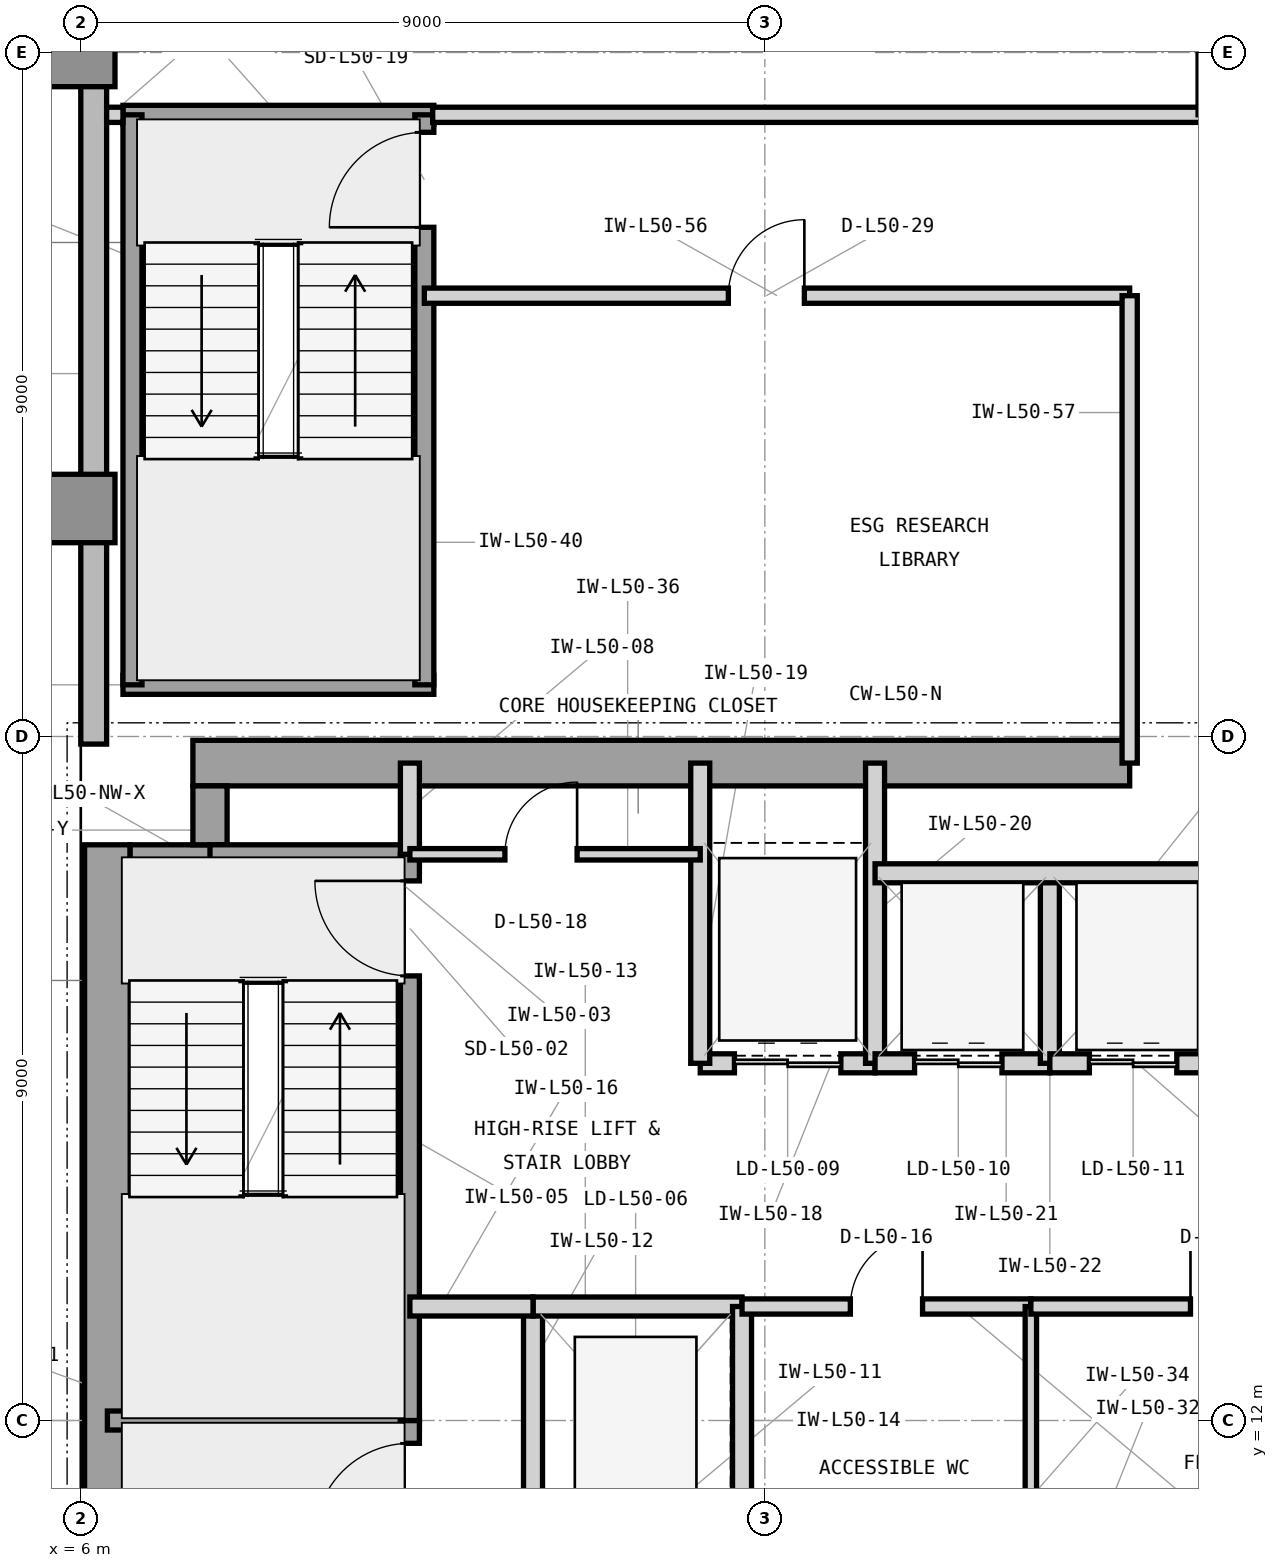
"""IFC4 building model, lengths in metres.
Left out: names, types, materials, properties, quantities, classifications, styles, units other than length and angle.
Written with IfcOpenShell. Run it as: python <this file> out.ifc"""

import sys

from ifc_helpers import new_model, si_unit, direction, frame, frame_2d, origin, origin_2d, place, context, subcontext, project, spatial, rectangle, extrude, element, fill, save


model = new_model("IFC4")
c1 = context("Model", 3, precision=1e-05, world=origin(), true_north=direction((0.0, 1.0)))
c2 = subcontext(c1, "Body", "Model", "MODEL_VIEW")
j1 = project(units=[si_unit("LENGTHUNIT", "METRE"), si_unit("PLANEANGLEUNIT", "RADIAN")], contexts=[c1])
p1 = place(None, origin())
s1 = spatial("IfcSite", under=j1, at=p1, CompositionType="ELEMENT")
p2 = place(p1, origin())
s2 = spatial("IfcBuilding", under=s1, at=p2, CompositionType="ELEMENT")
p3 = place(p2, frame((0.0, 0.0, 207.3)))
s3 = spatial("IfcBuildingStorey", under=s2, at=p3, CompositionType="ELEMENT", Elevation=207.3)
p4 = place(p3, frame((6.35, 4.425, 0.0), z_axis=(0.0, 0.0, 1.0), x_axis=(0.0, 1.0, 0.0)))
e1 = element("IfcWall", 1, at=p4, inside=s3, PredefinedType="SHEAR", context=c2, shape_type="SweptSolid", body=[
    extrude(rectangle(XDim=15.15, YDim=0.6, at=frame_2d((7.575, 0.0))), origin(), (0.0, 0.0, 1.0), 3.9),
])
p5 = place(p3, frame((7.475, 20.65, 0.0), z_axis=(0.0, 0.0, 1.0), x_axis=(1.0, 0.0, 0.0)))
e2 = element("IfcWall", 2, at=p5, inside=s3, PredefinedType="SHEAR", context=c2, shape_type="SweptSolid", body=[
    extrude(rectangle(XDim=12.325, YDim=0.6, at=frame_2d((6.163, 0.0))), origin(), (0.0, 0.0, 1.0), 3.9),
])
p6 = place(p3, frame((6.65, 19.35, 0.0), z_axis=(0.0, 0.0, 1.0), x_axis=(1.0, 0.0, 0.0)))
e3 = element("IfcWall", 3, at=p6, inside=s3, PredefinedType="SHEAR", context=c2, shape_type="SweptSolid", body=[
    extrude(rectangle(XDim=1.275, YDim=0.45, at=frame_2d((0.638, 0.0))), origin(), (0.0, 0.0, 1.0), 3.9),
])
p7 = place(p3, frame((7.7, 19.575, 0.0), z_axis=(0.0, 0.0, 1.0), x_axis=(0.0, 1.0, 0.0)))
e4 = element("IfcWall", 4, at=p7, inside=s3, PredefinedType="SHEAR", context=c2, shape_type="SweptSolid", body=[
    extrude(rectangle(XDim=0.775, YDim=0.45, at=frame_2d((0.388, 0.0))), origin(), (0.0, 0.0, 1.0), 3.9),
])
for number, where, z_axis, x_axis in (
    (5, (6.0, 24.0, 0.0), (0.0, 0.0, 1.0), (1.0, 0.0, 0.0)),
    (6, (6.0, 30.0, 0.0), (0.0, 0.0, 1.0), (1.0, 0.0, 0.0)),
):
    element("IfcColumn", number, at=place(p3, frame(where, z_axis=z_axis, x_axis=x_axis)), inside=s3, PredefinedType="COLUMN", context=c2, shape_type="SweptSolid", body=[
        extrude(rectangle(XDim=0.9, YDim=0.9, at=origin_2d()), origin(), (0.0, 0.0, 1.0), 3.9),
    ])
p8 = place(p3, frame((6.17, 40.4, 0.0), z_axis=(0.0, 0.0, 1.0), x_axis=(0.0, -1.0, 0.0)))
e7 = element("IfcWall", 7, at=p8, inside=s3, PredefinedType="STANDARD", context=c2, shape_type="SweptSolid", body=[
    extrude(rectangle(XDim=19.5, YDim=0.34, at=frame_2d((9.75, 0.0))), origin(), (0.0, 0.0, 1.0), 3.7),
])
p9 = place(p8, frame((7.125, 0.0, 0.9)))
e8 = element("IfcOpeningElement", 8, at=p9, cuts=e7, PredefinedType="OPENING", context=c2, shape_type="SweptSolid", body=[
    extrude(rectangle(XDim=2.3, YDim=2.2, at=frame_2d((1.15, 1.1))), frame((0.0, 0.18, 0.0), z_axis=(0.0, -1.0, 0.0), x_axis=(1.0, 0.0, 0.0)), (0.0, 0.0, 1.0), 0.36),
])
p10 = place(p3, frame((6.35, 12.0, 0.0), z_axis=(0.0, 0.0, 1.0), x_axis=(1.0, 0.0, 0.0)))
e9 = element("IfcWall", 9, at=p10, inside=s3, PredefinedType="SHEAR", context=c2, shape_type="SweptSolid", body=[
    extrude(rectangle(XDim=4.105, YDim=0.25, at=frame_2d((2.052, 0.0))), origin(), (0.0, 0.0, 1.0), 3.9),
])
p11 = place(p3, frame((7.7, 19.45, 0.0), z_axis=(0.0, 0.0, 1.0), x_axis=(1.0, 0.0, 0.0)))
e10 = element("IfcWall", 10, at=p11, inside=s3, PredefinedType="SHEAR", context=c2, shape_type="SweptSolid", body=[
    extrude(rectangle(XDim=2.755, YDim=0.25, at=frame_2d((1.377, 0.0))), origin(), (0.0, 0.0, 1.0), 3.9),
])
p12 = place(p3, frame((10.33, 4.55, 0.0), z_axis=(0.0, 0.0, 1.0), x_axis=(0.0, 1.0, 0.0)))
e11 = element("IfcWall", 11, at=p12, inside=s3, PredefinedType="SHEAR", context=c2, shape_type="SweptSolid", body=[
    extrude(rectangle(XDim=7.45, YDim=0.25, at=frame_2d((3.725, 0.0))), origin(), (0.0, 0.0, 1.0), 3.9),
])
p13 = place(p12, frame((5.9, 0.0, 0.0)))
e12 = element("IfcOpeningElement", 12, at=p13, cuts=e11, PredefinedType="OPENING", context=c2, shape_type="SweptSolid", body=[
    extrude(rectangle(XDim=1.25, YDim=2.2, at=frame_2d((0.625, 1.1))), frame((0.0, 0.135, 0.0), z_axis=(0.0, -1.0, 0.0), x_axis=(1.0, 0.0, 0.0)), (0.0, 0.0, 1.0), 0.27),
])
p14 = place(p3, frame((10.33, 12.0, 0.0), z_axis=(0.0, 0.0, 1.0), x_axis=(0.0, 1.0, 0.0)))
e13 = element("IfcWall", 13, at=p14, inside=s3, PredefinedType="SHEAR", context=c2, shape_type="SweptSolid", body=[
    extrude(rectangle(XDim=7.45, YDim=0.25, at=frame_2d((3.725, 0.0))), origin(), (0.0, 0.0, 1.0), 3.9),
])
p15 = place(p14, frame((5.85, 0.0, 0.0)))
e14 = element("IfcOpeningElement", 14, at=p15, cuts=e13, PredefinedType="OPENING", context=c2, shape_type="SweptSolid", body=[
    extrude(rectangle(XDim=1.25, YDim=2.2, at=frame_2d((0.625, 1.1))), frame((0.0, 0.135, 0.0), z_axis=(0.0, -1.0, 0.0), x_axis=(1.0, 0.0, 0.0)), (0.0, 0.0, 1.0), 0.27),
])
p16 = place(p3, frame((10.33, 19.45, 0.0), z_axis=(0.0, 0.0, 1.0), x_axis=(0.0, 1.0, 0.0)))
e15 = element("IfcWall", 15, at=p16, inside=s3, PredefinedType="PARTITIONING", context=c2, shape_type="SweptSolid", body=[
    extrude(rectangle(XDim=1.2, YDim=0.25, at=frame_2d((0.6, 0.0))), origin(), (0.0, 0.0, 1.0), 3.69),
])
p17 = place(p3, frame((11.95, 10.5, 0.0), z_axis=(0.0, 0.0, 1.0), x_axis=(0.0, 1.0, 0.0)))
e16 = element("IfcWall", 16, at=p17, inside=s3, PredefinedType="PARTITIONING", context=c2, shape_type="SweptSolid", body=[
    extrude(rectangle(XDim=3.0, YDim=0.25, at=frame_2d((1.5, 0.0))), origin(), (0.0, 0.0, 1.0), 3.69),
])
p18 = place(p3, frame((11.95, 13.5, 0.0), z_axis=(0.0, 0.0, 1.0), x_axis=(1.0, 0.0, 0.0)))
e17 = element("IfcWall", 17, at=p18, inside=s3, PredefinedType="PARTITIONING", context=c2, shape_type="SweptSolid", body=[
    extrude(rectangle(XDim=2.75, YDim=0.25, at=frame_2d((1.375, 0.0))), origin(), (0.0, 0.0, 1.0), 3.283),
])
p19 = place(p3, frame((14.7, 10.5, 0.0), z_axis=(0.0, 0.0, 1.0), x_axis=(0.0, 1.0, 0.0)))
e18 = element("IfcWall", 18, at=p19, inside=s3, PredefinedType="PARTITIONING", context=c2, shape_type="SweptSolid", body=[
    extrude(rectangle(XDim=3.0, YDim=0.25, at=frame_2d((1.5, 0.0))), origin(), (0.0, 0.0, 1.0), 3.69),
])
p20 = place(p3, frame((10.33, 13.5, 0.0), z_axis=(0.0, 0.0, 1.0), x_axis=(1.0, 0.0, 0.0)))
e19 = element("IfcWall", 19, at=p20, inside=s3, PredefinedType="PARTITIONING", context=c2, shape_type="SweptSolid", body=[
    extrude(rectangle(XDim=1.62, YDim=0.25, at=frame_2d((0.81, 0.0))), origin(), (0.0, 0.0, 1.0), 3.283),
])
p21 = place(p3, frame((14.15, 16.7, 0.0), z_axis=(0.0, 0.0, 1.0), x_axis=(1.0, 0.0, 0.0)))
e20 = element("IfcWall", 20, at=p21, inside=s3, PredefinedType="PARTITIONING", context=c2, shape_type="SweptSolid", body=[
    extrude(rectangle(XDim=2.3, YDim=0.25, at=frame_2d((1.15, 0.0))), origin(), (0.0, 0.0, 1.0), 3.283),
])
p22 = place(p21, frame((0.45, 0.0, 0.0)))
e21 = element("IfcOpeningElement", 21, at=p22, cuts=e20, PredefinedType="OPENING", context=c2, shape_type="SweptSolid", body=[
    extrude(rectangle(XDim=1.4, YDim=2.35, at=frame_2d((0.7, 1.175))), frame((0.0, 0.135, 0.0), z_axis=(0.0, -1.0, 0.0), x_axis=(1.0, 0.0, 0.0)), (0.0, 0.0, 1.0), 0.27),
])
for number, where, z_axis, x_axis in (
    (22, (14.15, 16.7, 0.0), (0.0, 0.0, 1.0), (0.0, 1.0, 0.0)),
    (23, (16.45, 16.7, 0.0), (0.0, 0.0, 1.0), (0.0, 1.0, 0.0)),
):
    element("IfcWall", number, at=place(p3, frame(where, z_axis=z_axis, x_axis=x_axis)), inside=s3, PredefinedType="PARTITIONING", context=c2, shape_type="SweptSolid", body=[
        extrude(rectangle(XDim=3.95, YDim=0.25, at=frame_2d((1.975, 0.0))), origin(), (0.0, 0.0, 1.0), 3.69),
    ])
p23 = place(p3, frame((16.45, 16.7, 0.0), z_axis=(0.0, 0.0, 1.0), x_axis=(1.0, 0.0, 0.0)))
e24 = element("IfcWall", 24, at=p23, inside=s3, PredefinedType="PARTITIONING", context=c2, shape_type="SweptSolid", body=[
    extrude(rectangle(XDim=2.3, YDim=0.25, at=frame_2d((1.15, 0.0))), origin(), (0.0, 0.0, 1.0), 3.283),
])
p24 = place(p23, frame((0.52, 0.0, 0.0)))
e25 = element("IfcOpeningElement", 25, at=p24, cuts=e24, PredefinedType="OPENING", context=c2, shape_type="SweptSolid", body=[
    extrude(rectangle(XDim=1.15, YDim=2.25, at=frame_2d((0.575, 1.125))), frame((0.0, 0.135, 0.0), z_axis=(0.0, -1.0, 0.0), x_axis=(1.0, 0.0, 0.0)), (0.0, 0.0, 1.0), 0.27),
])
p25 = place(p3, frame((18.75, 16.7, 0.0), z_axis=(0.0, 0.0, 1.0), x_axis=(0.0, 1.0, 0.0)))
e26 = element("IfcWall", 26, at=p25, inside=s3, PredefinedType="PARTITIONING", context=c2, shape_type="SweptSolid", body=[
    extrude(rectangle(XDim=2.5, YDim=0.25, at=frame_2d((1.25, 0.0))), origin(), (0.0, 0.0, 1.0), 3.69),
])
p26 = place(p3, frame((18.75, 16.7, 0.0), z_axis=(0.0, 0.0, 1.0), x_axis=(1.0, 0.0, 0.0)))
e27 = element("IfcWall", 27, at=p26, inside=s3, PredefinedType="PARTITIONING", context=c2, shape_type="SweptSolid", body=[
    extrude(rectangle(XDim=2.3, YDim=0.25, at=frame_2d((1.15, 0.0))), origin(), (0.0, 0.0, 1.0), 3.283),
])
p27 = place(p26, frame((0.52, 0.0, 0.0)))
e28 = element("IfcOpeningElement", 28, at=p27, cuts=e27, PredefinedType="OPENING", context=c2, shape_type="SweptSolid", body=[
    extrude(rectangle(XDim=1.15, YDim=2.25, at=frame_2d((0.575, 1.125))), frame((0.0, 0.135, 0.0), z_axis=(0.0, -1.0, 0.0), x_axis=(1.0, 0.0, 0.0)), (0.0, 0.0, 1.0), 0.27),
])
p28 = place(p3, frame((16.45, 19.2, 0.0), z_axis=(0.0, 0.0, 1.0), x_axis=(1.0, 0.0, 0.0)))
e29 = element("IfcWall", 29, at=p28, inside=s3, PredefinedType="PARTITIONING", context=c2, shape_type="SweptSolid", body=[
    extrude(rectangle(XDim=7.2, YDim=0.25, at=frame_2d((3.6, 0.0))), origin(), (0.0, 0.0, 1.0), 3.69),
])
p29 = place(p3, frame((14.7, 13.5, 0.0), z_axis=(0.0, 0.0, 1.0), x_axis=(1.0, 0.0, 0.0)))
e30 = element("IfcWall", 30, at=p29, inside=s3, PredefinedType="PARTITIONING", context=c2, shape_type="SweptSolid", body=[
    extrude(rectangle(XDim=3.8, YDim=0.2, at=frame_2d((1.9, 0.0))), origin(), (0.0, 0.0, 1.0), 3.283),
])
p30 = place(p29, frame((1.425, 0.0, 0.0)))
e31 = element("IfcOpeningElement", 31, at=p30, cuts=e30, PredefinedType="OPENING", context=c2, shape_type="SweptSolid", body=[
    extrude(rectangle(XDim=0.95, YDim=2.1, at=frame_2d((0.475, 1.05))), frame((0.0, 0.11, 0.0), z_axis=(0.0, -1.0, 0.0), x_axis=(1.0, 0.0, 0.0)), (0.0, 0.0, 1.0), 0.22),
])
p31 = place(p3, frame((18.5, 10.15, 0.0), z_axis=(0.0, 0.0, 1.0), x_axis=(0.0, 1.0, 0.0)))
e32 = element("IfcWall", 32, at=p31, inside=s3, PredefinedType="PARTITIONING", context=c2, shape_type="SweptSolid", body=[
    extrude(rectangle(XDim=3.35, YDim=0.15, at=frame_2d((1.675, 0.0))), origin(), (0.0, 0.0, 1.0), 3.69),
])
p32 = place(p3, frame((18.5, 13.5, 0.0), z_axis=(0.0, 0.0, 1.0), x_axis=(1.0, 0.0, 0.0)))
e33 = element("IfcWall", 33, at=p32, inside=s3, PredefinedType="PARTITIONING", context=c2, shape_type="SweptSolid", body=[
    extrude(rectangle(XDim=5.15, YDim=0.2, at=frame_2d((2.575, 0.0))), origin(), (0.0, 0.0, 1.0), 3.283),
])
p33 = place(p32, frame((2.1, 0.0, 0.0)))
e34 = element("IfcOpeningElement", 34, at=p33, cuts=e33, PredefinedType="OPENING", context=c2, shape_type="SweptSolid", body=[
    extrude(rectangle(XDim=0.95, YDim=2.1, at=frame_2d((0.475, 1.05))), frame((0.0, 0.11, 0.0), z_axis=(0.0, -1.0, 0.0), x_axis=(1.0, 0.0, 0.0)), (0.0, 0.0, 1.0), 0.22),
])
p34 = place(p3, frame((10.33, 19.45, 0.0), z_axis=(0.0, 0.0, 1.0), x_axis=(1.0, 0.0, 0.0)))
e35 = element("IfcWall", 35, at=p34, inside=s3, PredefinedType="PARTITIONING", context=c2, shape_type="SweptSolid", body=[
    extrude(rectangle(XDim=3.82, YDim=0.15, at=frame_2d((1.91, 0.0))), origin(), (0.0, 0.0, 1.0), 3.69),
])
p35 = place(p34, frame((1.25, 0.0, 0.0)))
e36 = element("IfcOpeningElement", 36, at=p35, cuts=e35, PredefinedType="OPENING", context=c2, shape_type="SweptSolid", body=[
    extrude(rectangle(XDim=0.95, YDim=2.1, at=frame_2d((0.475, 1.05))), frame((0.0, 0.085, 0.0), z_axis=(0.0, -1.0, 0.0), x_axis=(1.0, 0.0, 0.0)), (0.0, 0.0, 1.0), 0.17),
])
for number, where, z_axis, x_axis in (
    (37, (6.555, 21.68, 0.0), (0.0, 0.0, 1.0), (1.0, 0.0, 0.0)),
    (38, (6.555, 29.18, 0.0), (0.0, 0.0, 1.0), (1.0, 0.0, 0.0)),
):
    element("IfcWall", number, at=place(p3, frame(where, z_axis=z_axis, x_axis=x_axis)), inside=s3, PredefinedType="SHEAR", context=c2, shape_type="SweptSolid", body=[
        extrude(rectangle(XDim=4.09, YDim=0.25, at=frame_2d((2.045, 0.0))), origin(), (0.0, 0.0, 1.0), 3.9),
    ])
p36 = place(p3, frame((6.68, 21.68, 0.0), z_axis=(0.0, 0.0, 1.0), x_axis=(0.0, 1.0, 0.0)))
e39 = element("IfcWall", 39, at=p36, inside=s3, PredefinedType="SHEAR", context=c2, shape_type="SweptSolid", body=[
    extrude(rectangle(XDim=7.5, YDim=0.25, at=frame_2d((3.75, 0.0))), origin(), (0.0, 0.0, 1.0), 3.9),
])
p37 = place(p3, frame((10.52, 21.68, 0.0), z_axis=(0.0, 0.0, 1.0), x_axis=(0.0, 1.0, 0.0)))
e40 = element("IfcWall", 40, at=p37, inside=s3, PredefinedType="SHEAR", context=c2, shape_type="SweptSolid", body=[
    extrude(rectangle(XDim=7.5, YDim=0.25, at=frame_2d((3.75, 0.0))), origin(), (0.0, 0.0, 1.0), 3.9),
])
p38 = place(p37, frame((6.02, 0.0, 0.0)))
e41 = element("IfcOpeningElement", 41, at=p38, cuts=e40, PredefinedType="OPENING", context=c2, shape_type="SweptSolid", body=[
    extrude(rectangle(XDim=1.25, YDim=2.2, at=frame_2d((0.625, 1.1))), frame((0.0, 0.135, 0.0), z_axis=(0.0, -1.0, 0.0), x_axis=(1.0, 0.0, 0.0)), (0.0, 0.0, 1.0), 0.27),
])
p39 = place(p3, frame((10.52, 26.8, 0.0), z_axis=(0.0, 0.0, 1.0), x_axis=(1.0, 0.0, 0.0)))
e42 = element("IfcWall", 42, at=p39, inside=s3, PredefinedType="PARTITIONING", context=c2, shape_type="SweptSolid", body=[
    extrude(rectangle(XDim=9.28, YDim=0.2, at=frame_2d((4.64, 0.0))), origin(), (0.0, 0.0, 1.0), 3.69),
])
p40 = place(p39, frame((4.0, 0.0, 0.0)))
e43 = element("IfcOpeningElement", 43, at=p40, cuts=e42, PredefinedType="OPENING", context=c2, shape_type="SweptSolid", body=[
    extrude(rectangle(XDim=1.0, YDim=2.15, at=frame_2d((0.5, 1.075))), frame((0.0, 0.11, 0.0), z_axis=(0.0, -1.0, 0.0), x_axis=(1.0, 0.0, 0.0)), (0.0, 0.0, 1.0), 0.22),
])
p41 = place(p3, frame((19.8, 20.65, 0.0), z_axis=(0.0, 0.0, 1.0), x_axis=(0.0, 1.0, 0.0)))
e44 = element("IfcWall", 44, at=p41, inside=s3, PredefinedType="PARTITIONING", context=c2, shape_type="SweptSolid", body=[
    extrude(rectangle(XDim=6.15, YDim=0.2, at=frame_2d((3.075, 0.0))), origin(), (0.0, 0.0, 1.0), 3.69),
])
p42 = place(p3, frame((6.34, 29.18, 0.0), z_axis=(0.0, 0.0, 1.0), x_axis=(1.0, 0.0, 0.0)))
e45 = element("IfcWall", 45, at=p42, inside=s3, PredefinedType="PARTITIONING", context=c2, shape_type="SweptSolid", body=[
    extrude(rectangle(XDim=0.215, YDim=0.2, at=frame_2d((0.107, 0.0))), origin(), (0.0, 0.0, 1.0), 3.69),
])
p43 = place(p3, frame((10.63, 29.18, 0.0), z_axis=(0.0, 0.0, 1.0), x_axis=(1.0, 0.0, 0.0)))
e46 = element("IfcWall", 46, at=p43, inside=s3, PredefinedType="PARTITIONING", context=c2, shape_type="SweptSolid", body=[
    extrude(rectangle(XDim=10.17, YDim=0.2, at=frame_2d((5.085, 0.0))), origin(), (0.0, 0.0, 1.0), 3.69),
])
p44 = place(p13, origin())
e47 = element("IfcDoor", 47, at=p44, inside=s3, OperationType="SINGLE_SWING_LEFT", PredefinedType="DOOR", context=c2, shape_type="SweptSolid", body=[
    extrude(rectangle(XDim=1.25, YDim=2.2, at=frame_2d((0.625, 1.1))), frame((0.0, 0.025, 0.0), z_axis=(0.0, -1.0, 0.0), x_axis=(1.0, 0.0, 0.0)), (0.0, 0.0, 1.0), 0.05),
])
fill(e12, e47)
p45 = place(p15, origin())
e48 = element("IfcDoor", 48, at=p45, inside=s3, OperationType="SINGLE_SWING_RIGHT", PredefinedType="DOOR", context=c2, shape_type="SweptSolid", body=[
    extrude(rectangle(XDim=1.25, YDim=2.2, at=frame_2d((0.625, 1.1))), frame((0.0, 0.025, 0.0), z_axis=(0.0, -1.0, 0.0), x_axis=(1.0, 0.0, 0.0)), (0.0, 0.0, 1.0), 0.05),
])
fill(e14, e48)
p46 = place(p22, origin())
e49 = element("IfcDoor", 49, at=p46, inside=s3, OperationType="DOUBLE_DOOR_SLIDING", PredefinedType="DOOR", context=c2, shape_type="SweptSolid", body=[
    extrude(rectangle(XDim=1.4, YDim=2.35, at=frame_2d((0.7, 1.175))), frame((0.0, 0.025, 0.0), z_axis=(0.0, -1.0, 0.0), x_axis=(1.0, 0.0, 0.0)), (0.0, 0.0, 1.0), 0.05),
])
fill(e21, e49)
p47 = place(p24, origin())
e50 = element("IfcDoor", 50, at=p47, inside=s3, OperationType="DOUBLE_DOOR_SLIDING", PredefinedType="DOOR", context=c2, shape_type="SweptSolid", body=[
    extrude(rectangle(XDim=1.15, YDim=2.25, at=frame_2d((0.575, 1.125))), frame((0.0, 0.025, 0.0), z_axis=(0.0, -1.0, 0.0), x_axis=(1.0, 0.0, 0.0)), (0.0, 0.0, 1.0), 0.05),
])
fill(e25, e50)
p48 = place(p27, origin())
e51 = element("IfcDoor", 51, at=p48, inside=s3, OperationType="DOUBLE_DOOR_SLIDING", PredefinedType="DOOR", context=c2, shape_type="SweptSolid", body=[
    extrude(rectangle(XDim=1.15, YDim=2.25, at=frame_2d((0.575, 1.125))), frame((0.0, 0.025, 0.0), z_axis=(0.0, -1.0, 0.0), x_axis=(1.0, 0.0, 0.0)), (0.0, 0.0, 1.0), 0.05),
])
fill(e28, e51)
p49 = place(p30, origin())
e52 = element("IfcDoor", 52, at=p49, inside=s3, OperationType="SINGLE_SWING_RIGHT", PredefinedType="DOOR", context=c2, shape_type="SweptSolid", body=[
    extrude(rectangle(XDim=0.95, YDim=2.1, at=frame_2d((0.475, 1.05))), frame((0.0, 0.025, 0.0), z_axis=(0.0, -1.0, 0.0), x_axis=(1.0, 0.0, 0.0)), (0.0, 0.0, 1.0), 0.05),
])
fill(e31, e52)
p50 = place(p33, origin())
e53 = element("IfcDoor", 53, at=p50, inside=s3, OperationType="SINGLE_SWING_LEFT", PredefinedType="DOOR", context=c2, shape_type="SweptSolid", body=[
    extrude(rectangle(XDim=0.95, YDim=2.1, at=frame_2d((0.475, 1.05))), frame((0.0, 0.025, 0.0), z_axis=(0.0, -1.0, 0.0), x_axis=(1.0, 0.0, 0.0)), (0.0, 0.0, 1.0), 0.05),
])
fill(e34, e53)
p51 = place(p35, origin())
e54 = element("IfcDoor", 54, at=p51, inside=s3, OperationType="SINGLE_SWING_RIGHT", PredefinedType="DOOR", context=c2, shape_type="SweptSolid", body=[
    extrude(rectangle(XDim=0.95, YDim=2.1, at=frame_2d((0.475, 1.05))), frame((0.0, 0.025, 0.0), z_axis=(0.0, -1.0, 0.0), x_axis=(1.0, 0.0, 0.0)), (0.0, 0.0, 1.0), 0.05),
])
fill(e36, e54)
p52 = place(p38, origin())
e55 = element("IfcDoor", 55, at=p52, inside=s3, OperationType="SINGLE_SWING_LEFT", PredefinedType="DOOR", context=c2, shape_type="SweptSolid", body=[
    extrude(rectangle(XDim=1.25, YDim=2.2, at=frame_2d((0.625, 1.1))), frame((0.0, 0.025, 0.0), z_axis=(0.0, -1.0, 0.0), x_axis=(1.0, 0.0, 0.0)), (0.0, 0.0, 1.0), 0.05),
])
fill(e41, e55)
p53 = place(p40, origin())
e56 = element("IfcDoor", 56, at=p53, inside=s3, OperationType="SINGLE_SWING_RIGHT", PredefinedType="DOOR", context=c2, shape_type="SweptSolid", body=[
    extrude(rectangle(XDim=1.0, YDim=2.15, at=frame_2d((0.5, 1.075))), frame((0.0, 0.025, 0.0), z_axis=(0.0, -1.0, 0.0), x_axis=(1.0, 0.0, 0.0)), (0.0, 0.0, 1.0), 0.05),
])
fill(e43, e56)
save(model, sys.argv[1])
